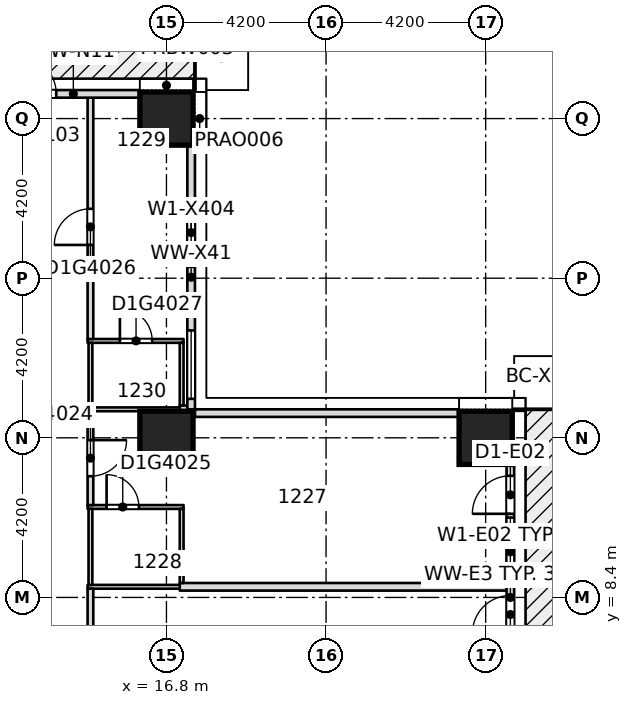
"""IFC4 building model, lengths in metres.
Left out: names, types, materials, properties, quantities, classifications, styles, units other than length and angle.
Written with IfcOpenShell. Run it as: python <this file> out.ifc"""

import sys

from ifc_helpers import new_model, si_unit, direction, frame, frame_2d, origin, origin_2d, place, context, subcontext, project, spatial, rectangle, extrude, element, fill, save


model = new_model("IFC4")
c1 = context("Model", 3, precision=1e-05, world=origin(), true_north=direction((0.0, 1.0)))
c2 = subcontext(c1, "Body", "Model", "MODEL_VIEW")
j1 = project(units=[si_unit("LENGTHUNIT", "METRE"), si_unit("PLANEANGLEUNIT", "RADIAN")], contexts=[c1])
p1 = place(None, origin())
s1 = spatial("IfcSite", under=j1, at=p1, CompositionType="ELEMENT")
p2 = place(p1, origin())
s2 = spatial("IfcBuilding", under=s1, at=p2, CompositionType="ELEMENT")
p3 = place(p2, frame((0.0, 0.0, 55.2)))
s3 = spatial("IfcBuildingStorey", under=s2, at=p3, CompositionType="ELEMENT", Elevation=55.2)
for number, where, z_axis, x_axis in (
    (1, (16.8, 12.6, -0.32), (0.0, 0.0, 1.0), (1.0, 0.0, 0.0)),
    (2, (25.2, 12.6, -0.32), (0.0, 0.0, 1.0), (1.0, 0.0, 0.0)),
    (3, (16.8, 21.0, -0.32), (0.0, 0.0, 1.0), (1.0, 0.0, 0.0)),
):
    element("IfcColumn", number, at=place(p3, frame(where, z_axis=z_axis, x_axis=x_axis)), inside=s3, PredefinedType="COLUMN", context=c2, shape_type="SweptSolid", body=[
        extrude(rectangle(XDim=1.4, YDim=1.4, at=origin_2d()), origin(), (0.0, 0.0, 1.0), 3.45),
    ])
p4 = place(p3, frame((14.725, 8.68, 0.0), z_axis=(0.0, 0.0, 1.0), x_axis=(1.0, 0.0, 0.0)))
e4 = element("IfcWall", 4, at=p4, inside=s3, PredefinedType="PARTITIONING", context=c2, shape_type="SweptSolid", body=[
    extrude(rectangle(XDim=2.525, YDim=0.1, at=frame_2d((1.262, 0.0))), origin(), (0.0, 0.0, 1.0), 3.13),
])
p5 = place(p3, frame((17.15, 8.68, 0.0), z_axis=(0.0, 0.0, 1.0), x_axis=(1.0, 0.0, 0.0)))
e5 = element("IfcWall", 5, at=p5, inside=s3, PredefinedType="PARTITIONING", context=c2, shape_type="SweptSolid", body=[
    extrude(rectangle(XDim=8.6, YDim=0.2, at=frame_2d((4.3, 0.0))), origin(), (0.0, 0.0, 1.0), 3.13),
])
p6 = place(p3, frame((14.725, 10.78, 0.0), z_axis=(0.0, 0.0, 1.0), x_axis=(1.0, 0.0, 0.0)))
e6 = element("IfcWall", 6, at=p6, inside=s3, PredefinedType="PARTITIONING", context=c2, shape_type="SweptSolid", body=[
    extrude(rectangle(XDim=2.525, YDim=0.1, at=frame_2d((1.262, 0.0))), origin(), (0.0, 0.0, 1.0), 3.13),
])
p7 = place(p6, frame((0.5, 0.0, 0.0)))
e7 = element("IfcOpeningElement", 7, at=p7, cuts=e6, PredefinedType="OPENING", context=c2, shape_type="SweptSolid", body=[
    extrude(rectangle(XDim=0.85, YDim=2.1, at=frame_2d((0.425, 1.05))), frame((0.0, 0.06, 0.0), z_axis=(0.0, -1.0, 0.0), x_axis=(1.0, 0.0, 0.0)), (0.0, 0.0, 1.0), 0.12),
])
p8 = place(p3, frame((14.725, 13.35, 0.0), z_axis=(0.0, 0.0, 1.0), x_axis=(1.0, 0.0, 0.0)))
e8 = element("IfcWall", 8, at=p8, inside=s3, PredefinedType="PARTITIONING", context=c2, shape_type="SweptSolid", body=[
    extrude(rectangle(XDim=2.525, YDim=0.1, at=frame_2d((1.262, 0.0))), origin(), (0.0, 0.0, 1.0), 3.13),
])
p9 = place(p3, frame((17.15, 13.35, 0.0), z_axis=(0.0, 0.0, 1.0), x_axis=(1.0, 0.0, 0.0)))
e9 = element("IfcWall", 9, at=p9, inside=s3, PredefinedType="PARTITIONING", context=c2, shape_type="SweptSolid", body=[
    extrude(rectangle(XDim=0.2, YDim=0.2, at=frame_2d((0.1, 0.0))), origin(), (0.0, 0.0, 1.0), 3.13),
])
p10 = place(p3, frame((14.725, 15.15, 0.0), z_axis=(0.0, 0.0, 1.0), x_axis=(1.0, 0.0, 0.0)))
e10 = element("IfcWall", 10, at=p10, inside=s3, PredefinedType="PARTITIONING", context=c2, shape_type="SweptSolid", body=[
    extrude(rectangle(XDim=2.525, YDim=0.1, at=frame_2d((1.262, 0.0))), origin(), (0.0, 0.0, 1.0), 3.13),
])
p11 = place(p10, frame((0.85, 0.0, 0.0)))
e11 = element("IfcOpeningElement", 11, at=p11, cuts=e10, PredefinedType="OPENING", context=c2, shape_type="SweptSolid", body=[
    extrude(rectangle(XDim=0.85, YDim=2.1, at=frame_2d((0.425, 1.05))), frame((0.0, 0.06, 0.0), z_axis=(0.0, -1.0, 0.0), x_axis=(1.0, 0.0, 0.0)), (0.0, 0.0, 1.0), 0.12),
])
p12 = place(p3, frame((14.8, -10.525, 0.0), z_axis=(0.0, 0.0, 1.0), x_axis=(0.0, 1.0, 0.0)))
e12 = element("IfcWall", 12, at=p12, inside=s3, PredefinedType="PARTITIONING", context=c2, shape_type="SweptSolid", body=[
    extrude(rectangle(XDim=19.155, YDim=0.15, at=frame_2d((9.577, 0.0))), origin(), (0.0, 0.0, 1.0), 3.13),
])
p13 = place(p12, frame((0.925, 0.0, 0.0)))
e13 = element("IfcOpeningElement", 13, at=p13, cuts=e12, PredefinedType="OPENING", context=c2, shape_type="SweptSolid", body=[
    extrude(rectangle(XDim=1.0, YDim=2.1, at=frame_2d((0.5, 1.05))), frame((0.0, 0.085, 0.0), z_axis=(0.0, -1.0, 0.0), x_axis=(1.0, 0.0, 0.0)), (0.0, 0.0, 1.0), 0.17),
])
p14 = place(p12, frame((16.065, 0.0, 0.0)))
e14 = element("IfcOpeningElement", 14, at=p14, cuts=e12, PredefinedType="OPENING", context=c2, shape_type="SweptSolid", body=[
    extrude(rectangle(XDim=1.0, YDim=2.1, at=frame_2d((0.5, 1.05))), frame((0.0, 0.085, 0.0), z_axis=(0.0, -1.0, 0.0), x_axis=(1.0, 0.0, 0.0)), (0.0, 0.0, 1.0), 0.17),
])
p15 = place(p12, frame((9.975, 0.0, 0.0)))
e15 = element("IfcOpeningElement", 15, at=p15, cuts=e12, PredefinedType="OPENING", context=c2, shape_type="SweptSolid", body=[
    extrude(rectangle(XDim=1.1, YDim=2.1, at=frame_2d((0.55, 1.05))), frame((0.0, 0.085, 0.0), z_axis=(0.0, -1.0, 0.0), x_axis=(1.0, 0.0, 0.0)), (0.0, 0.0, 1.0), 0.17),
])
p16 = place(p12, frame((4.725, 0.0, 0.0)))
e16 = element("IfcOpeningElement", 16, at=p16, cuts=e12, PredefinedType="OPENING", context=c2, shape_type="SweptSolid", body=[
    extrude(rectangle(XDim=1.0, YDim=2.1, at=frame_2d((0.5, 1.05))), frame((0.0, 0.085, 0.0), z_axis=(0.0, -1.0, 0.0), x_axis=(1.0, 0.0, 0.0)), (0.0, 0.0, 1.0), 0.17),
])
p17 = place(p3, frame((14.8, 8.73, 0.0), z_axis=(0.0, 0.0, 1.0), x_axis=(0.0, 1.0, 0.0)))
e17 = element("IfcWall", 17, at=p17, inside=s3, PredefinedType="PARTITIONING", context=c2, shape_type="SweptSolid", body=[
    extrude(rectangle(XDim=2.0, YDim=0.1, at=frame_2d((1.0, 0.0))), origin(), (0.0, 0.0, 1.0), 3.13),
])
p18 = place(p3, frame((14.8, 10.83, 0.0), z_axis=(0.0, 0.0, 1.0), x_axis=(0.0, 1.0, 0.0)))
e18 = element("IfcWall", 18, at=p18, inside=s3, PredefinedType="PARTITIONING", context=c2, shape_type="SweptSolid", body=[
    extrude(rectangle(XDim=2.47, YDim=0.15, at=frame_2d((1.235, 0.0))), origin(), (0.0, 0.0, 1.0), 3.13),
])
p19 = place(p18, frame((0.76, 0.0, 0.0)))
e19 = element("IfcOpeningElement", 19, at=p19, cuts=e18, PredefinedType="OPENING", context=c2, shape_type="SweptSolid", body=[
    extrude(rectangle(XDim=0.95, YDim=2.1, at=frame_2d((0.475, 1.05))), frame((0.0, 0.085, 0.0), z_axis=(0.0, -1.0, 0.0), x_axis=(1.0, 0.0, 0.0)), (0.0, 0.0, 1.0), 0.17),
])
p20 = place(p3, frame((14.8, 13.4, 0.0), z_axis=(0.0, 0.0, 1.0), x_axis=(0.0, 1.0, 0.0)))
e20 = element("IfcWall", 20, at=p20, inside=s3, PredefinedType="PARTITIONING", context=c2, shape_type="SweptSolid", body=[
    extrude(rectangle(XDim=1.7, YDim=0.1, at=frame_2d((0.85, 0.0))), origin(), (0.0, 0.0, 1.0), 3.13),
])
p21 = place(p3, frame((14.8, 15.2, 0.0), z_axis=(0.0, 0.0, 1.0), x_axis=(0.0, 1.0, 0.0)))
e21 = element("IfcWall", 21, at=p21, inside=s3, PredefinedType="PARTITIONING", context=c2, shape_type="SweptSolid", body=[
    extrude(rectangle(XDim=6.35, YDim=0.15, at=frame_2d((3.175, 0.0))), origin(), (0.0, 0.0, 1.0), 3.13),
])
p22 = place(p21, frame((2.475, 0.0, 0.0)))
e22 = element("IfcOpeningElement", 22, at=p22, cuts=e21, PredefinedType="OPENING", context=c2, shape_type="SweptSolid", body=[
    extrude(rectangle(XDim=0.95, YDim=2.1, at=frame_2d((0.475, 1.05))), frame((0.0, 0.085, 0.0), z_axis=(0.0, -1.0, 0.0), x_axis=(1.0, 0.0, 0.0)), (0.0, 0.0, 1.0), 0.17),
])
p23 = place(p3, frame((17.2, 8.78, 0.0), z_axis=(0.0, 0.0, 1.0), x_axis=(0.0, 1.0, 0.0)))
e23 = element("IfcWall", 23, at=p23, inside=s3, PredefinedType="PARTITIONING", context=c2, shape_type="SweptSolid", body=[
    extrude(rectangle(XDim=1.95, YDim=0.1, at=frame_2d((0.975, 0.0))), origin(), (0.0, 0.0, 1.0), 3.13),
])
p24 = place(p3, frame((17.2, 13.45, 0.0), z_axis=(0.0, 0.0, 1.0), x_axis=(0.0, 1.0, 0.0)))
e24 = element("IfcWall", 24, at=p24, inside=s3, PredefinedType="PARTITIONING", context=c2, shape_type="SweptSolid", body=[
    extrude(rectangle(XDim=1.65, YDim=0.1, at=frame_2d((0.825, 0.0))), origin(), (0.0, 0.0, 1.0), 3.13),
])
p25 = place(p3, frame((25.85, 4.9, 0.0), z_axis=(0.0, 0.0, 1.0), x_axis=(0.0, 1.0, 0.0)))
e25 = element("IfcWall", 25, at=p25, inside=s3, PredefinedType="STANDARD", context=c2, shape_type="SweptSolid", body=[
    extrude(rectangle(XDim=7.0, YDim=0.2, at=frame_2d((3.5, 0.0))), origin(), (0.0, 0.0, 1.0), 3.13),
])
p26 = place(p25, frame((2.55, 0.0, 0.0)))
e26 = element("IfcOpeningElement", 26, at=p26, cuts=e25, PredefinedType="OPENING", context=c2, shape_type="SweptSolid", body=[
    extrude(rectangle(XDim=1.0, YDim=2.4, at=frame_2d((0.5, 1.2))), frame((0.0, 0.11, 0.0), z_axis=(0.0, -1.0, 0.0), x_axis=(1.0, 0.0, 0.0)), (0.0, 0.0, 1.0), 0.22),
])
p27 = place(p25, frame((3.8, 0.0, 0.2)))
e27 = element("IfcOpeningElement", 27, at=p27, cuts=e25, PredefinedType="OPENING", context=c2, shape_type="SweptSolid", body=[
    extrude(rectangle(XDim=1.8, YDim=2.65, at=frame_2d((0.9, 1.325))), frame((0.0, 0.11, 0.0), z_axis=(0.0, -1.0, 0.0), x_axis=(1.0, 0.0, 0.0)), (0.0, 0.0, 1.0), 0.22),
])
p28 = place(p25, frame((5.7, 0.0, 0.0)))
e28 = element("IfcOpeningElement", 28, at=p28, cuts=e25, PredefinedType="OPENING", context=c2, shape_type="SweptSolid", body=[
    extrude(rectangle(XDim=1.0, YDim=2.4, at=frame_2d((0.5, 1.2))), frame((0.0, 0.11, 0.0), z_axis=(0.0, -1.0, 0.0), x_axis=(1.0, 0.0, 0.0)), (0.0, 0.0, 1.0), 0.22),
])
p29 = place(p3, frame((24.5, 13.25, 0.0), z_axis=(0.0, 0.0, 1.0), x_axis=(-1.0, 0.0, 0.0)))
e29 = element("IfcWall", 29, at=p29, inside=s3, PredefinedType="STANDARD", context=c2, shape_type="SweptSolid", body=[
    extrude(rectangle(XDim=6.95, YDim=0.2, at=frame_2d((3.475, 0.0))), origin(), (0.0, 0.0, 1.0), 3.13),
])
p30 = place(p3, frame((17.45, 13.35, 0.0), z_axis=(0.0, 0.0, 1.0), x_axis=(0.0, 1.0, 0.0)))
e30 = element("IfcWall", 30, at=p30, inside=s3, PredefinedType="STANDARD", context=c2, shape_type="SweptSolid", body=[
    extrude(rectangle(XDim=6.95, YDim=0.2, at=frame_2d((3.475, 0.0))), origin(), (0.0, 0.0, 1.0), 3.13),
])
p31 = place(p30, frame((0.275, 0.0, 0.2)))
e31 = element("IfcOpeningElement", 31, at=p31, cuts=e30, PredefinedType="OPENING", context=c2, shape_type="SweptSolid", body=[
    extrude(rectangle(XDim=1.8, YDim=2.65, at=frame_2d((0.9, 1.325))), frame((0.0, 0.11, 0.0), z_axis=(0.0, -1.0, 0.0), x_axis=(1.0, 0.0, 0.0)), (0.0, 0.0, 1.0), 0.22),
])
p32 = place(p30, frame((3.75, 0.0, 0.2)))
e32 = element("IfcOpeningElement", 32, at=p32, cuts=e30, PredefinedType="OPENING", context=c2, shape_type="SweptSolid", body=[
    extrude(rectangle(XDim=1.8, YDim=2.65, at=frame_2d((0.9, 1.325))), frame((0.0, 0.11, 0.0), z_axis=(0.0, -1.0, 0.0), x_axis=(1.0, 0.0, 0.0)), (0.0, 0.0, 1.0), 0.22),
])
p33 = place(p3, frame((16.1, 21.65, 0.0), z_axis=(0.0, 0.0, 1.0), x_axis=(-1.0, 0.0, 0.0)))
e33 = element("IfcWall", 33, at=p33, inside=s3, PredefinedType="STANDARD", context=c2, shape_type="SweptSolid", body=[
    extrude(rectangle(XDim=3.5, YDim=0.2, at=frame_2d((1.75, 0.0))), origin(), (0.0, 0.0, 1.0), 3.13),
])
p34 = place(p33, frame((2.2, 0.0, 0.0)))
e34 = element("IfcOpeningElement", 34, at=p34, cuts=e33, PredefinedType="OPENING", context=c2, shape_type="SweptSolid", body=[
    extrude(rectangle(XDim=1.0, YDim=2.4, at=frame_2d((0.5, 1.2))), frame((0.0, 0.11, 0.0), z_axis=(0.0, -1.0, 0.0), x_axis=(1.0, 0.0, 0.0)), (0.0, 0.0, 1.0), 0.22),
])
p35 = place(p19, origin())
e35 = element("IfcDoor", 35, at=p35, inside=s3, OperationType="SINGLE_SWING_RIGHT", PredefinedType="DOOR", context=c2, shape_type="SweptSolid", body=[
    extrude(rectangle(XDim=0.95, YDim=2.1, at=frame_2d((0.475, 1.05))), frame((0.0, 0.025, 0.0), z_axis=(0.0, -1.0, 0.0), x_axis=(1.0, 0.0, 0.0)), (0.0, 0.0, 1.0), 0.05),
])
fill(e19, e35)
p36 = place(p7, origin())
e36 = element("IfcDoor", 36, at=p36, inside=s3, OperationType="SINGLE_SWING_RIGHT", PredefinedType="DOOR", context=c2, shape_type="SweptSolid", body=[
    extrude(rectangle(XDim=0.85, YDim=2.1, at=frame_2d((0.425, 1.05))), frame((0.0, 0.025, 0.0), z_axis=(0.0, -1.0, 0.0), x_axis=(1.0, 0.0, 0.0)), (0.0, 0.0, 1.0), 0.05),
])
fill(e7, e36)
p37 = place(p22, origin())
e37 = element("IfcDoor", 37, at=p37, inside=s3, OperationType="SINGLE_SWING_LEFT", PredefinedType="DOOR", context=c2, shape_type="SweptSolid", body=[
    extrude(rectangle(XDim=0.95, YDim=2.1, at=frame_2d((0.475, 1.05))), frame((0.0, 0.025, 0.0), z_axis=(0.0, -1.0, 0.0), x_axis=(1.0, 0.0, 0.0)), (0.0, 0.0, 1.0), 0.05),
])
fill(e22, e37)
p38 = place(p11, origin())
e38 = element("IfcDoor", 38, at=p38, inside=s3, OperationType="SINGLE_SWING_RIGHT", PredefinedType="DOOR", context=c2, shape_type="SweptSolid", body=[
    extrude(rectangle(XDim=0.85, YDim=2.1, at=frame_2d((0.425, 1.05))), frame((0.0, 0.025, 0.0), z_axis=(0.0, -1.0, 0.0), x_axis=(1.0, 0.0, 0.0)), (0.0, 0.0, 1.0), 0.05),
])
fill(e11, e38)
p39 = place(p26, origin())
e39 = element("IfcDoor", 39, at=p39, inside=s3, OperationType="SINGLE_SWING_LEFT", PredefinedType="DOOR", context=c2, shape_type="SweptSolid", body=[
    extrude(rectangle(XDim=1.0, YDim=2.4, at=frame_2d((0.5, 1.2))), frame((0.0, 0.025, 0.0), z_axis=(0.0, -1.0, 0.0), x_axis=(1.0, 0.0, 0.0)), (0.0, 0.0, 1.0), 0.05),
])
fill(e26, e39)
p40 = place(p27, origin())
e40 = element("IfcWindow", 40, at=p40, inside=s3, PartitioningType="SINGLE_PANEL", PredefinedType="WINDOW", context=c2, shape_type="SweptSolid", body=[
    extrude(rectangle(XDim=1.8, YDim=2.65, at=frame_2d((0.9, 1.325))), frame((0.0, 0.03, 0.0), z_axis=(0.0, -1.0, 0.0), x_axis=(1.0, 0.0, 0.0)), (0.0, 0.0, 1.0), 0.06),
])
fill(e27, e40)
p41 = place(p28, origin())
e41 = element("IfcDoor", 41, at=p41, inside=s3, OperationType="SINGLE_SWING_LEFT", PredefinedType="DOOR", context=c2, shape_type="SweptSolid", body=[
    extrude(rectangle(XDim=1.0, YDim=2.4, at=frame_2d((0.5, 1.2))), frame((0.0, 0.025, 0.0), z_axis=(0.0, -1.0, 0.0), x_axis=(1.0, 0.0, 0.0)), (0.0, 0.0, 1.0), 0.05),
])
fill(e28, e41)
p42 = place(p31, origin())
e42 = element("IfcWindow", 42, at=p42, inside=s3, PartitioningType="SINGLE_PANEL", PredefinedType="WINDOW", context=c2, shape_type="SweptSolid", body=[
    extrude(rectangle(XDim=1.8, YDim=2.65, at=frame_2d((0.9, 1.325))), frame((0.0, 0.03, 0.0), z_axis=(0.0, -1.0, 0.0), x_axis=(1.0, 0.0, 0.0)), (0.0, 0.0, 1.0), 0.06),
])
fill(e31, e42)
p43 = place(p32, origin())
e43 = element("IfcWindow", 43, at=p43, inside=s3, PartitioningType="SINGLE_PANEL", PredefinedType="WINDOW", context=c2, shape_type="SweptSolid", body=[
    extrude(rectangle(XDim=1.8, YDim=2.65, at=frame_2d((0.9, 1.325))), frame((0.0, 0.03, 0.0), z_axis=(0.0, -1.0, 0.0), x_axis=(1.0, 0.0, 0.0)), (0.0, 0.0, 1.0), 0.06),
])
fill(e32, e43)
p44 = place(p34, origin())
e44 = element("IfcDoor", 44, at=p44, inside=s3, OperationType="SINGLE_SWING_LEFT", PredefinedType="DOOR", context=c2, shape_type="SweptSolid", body=[
    extrude(rectangle(XDim=1.0, YDim=2.4, at=frame_2d((0.5, 1.2))), frame((0.0, 0.025, 0.0), z_axis=(0.0, -1.0, 0.0), x_axis=(1.0, 0.0, 0.0)), (0.0, 0.0, 1.0), 0.05),
])
fill(e34, e44)
save(model, sys.argv[1])
